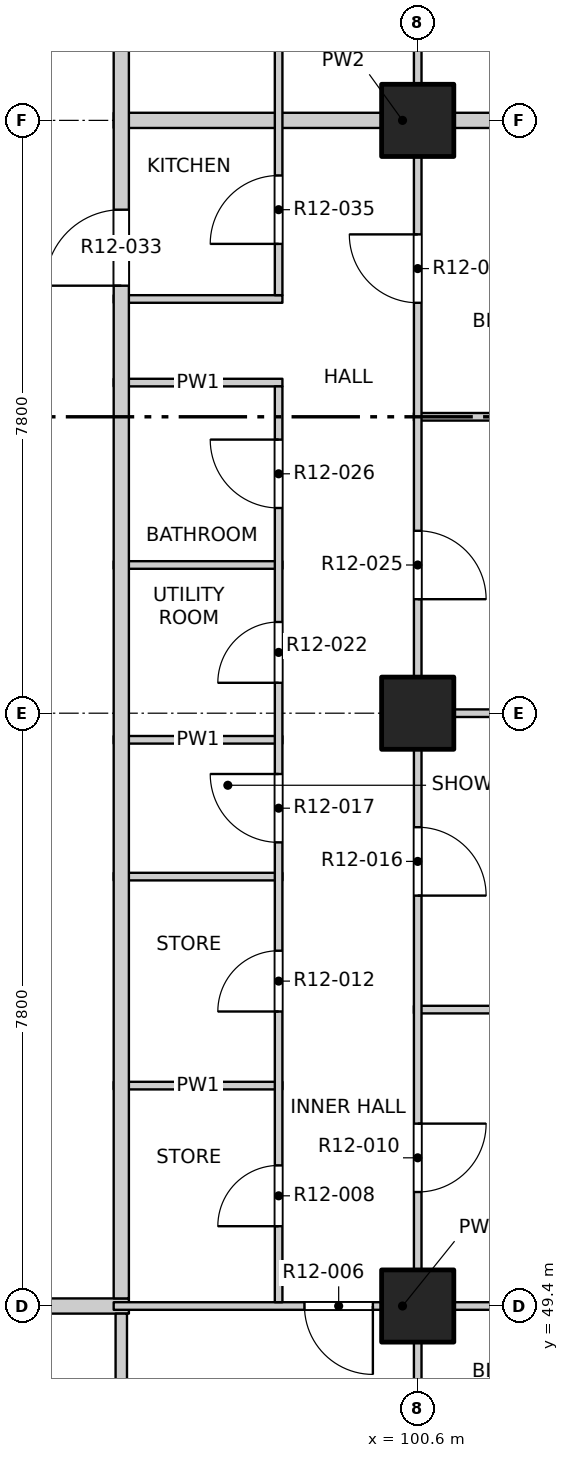
"""IFC4 building model, lengths in metres.
Left out: names, types, materials, properties, quantities, classifications, styles, units other than length and angle.
Written with IfcOpenShell. Run it as: python <this file> out.ifc"""

import sys

from ifc_helpers import new_model, si_unit, direction, frame, frame_2d, origin, origin_2d, place, context, subcontext, project, spatial, rectangle, extrude, element, fill, save


model = new_model("IFC4")
c1 = context("Model", 3, precision=1e-05, world=origin(), true_north=direction((0.0, 1.0)))
c2 = subcontext(c1, "Body", "Model", "MODEL_VIEW")
j1 = project(units=[si_unit("LENGTHUNIT", "METRE"), si_unit("PLANEANGLEUNIT", "RADIAN")], contexts=[c1])
p1 = place(None, origin())
s1 = spatial("IfcSite", under=j1, at=p1, CompositionType="ELEMENT")
p2 = place(p1, origin())
s2 = spatial("IfcBuilding", under=s1, at=p2, CompositionType="ELEMENT")
p3 = place(p2, frame((0.0, 0.0, 137.3)))
s3 = spatial("IfcBuildingStorey", under=s2, at=p3, CompositionType="ELEMENT", Elevation=137.3)
for number, where, z_axis, x_axis in (
    (1, (100.6, 49.4, -0.25), (0.0, 0.0, 1.0), (1.0, 0.0, 0.0)),
    (2, (100.6, 57.2, -0.25), (0.0, 0.0, 1.0), (1.0, 0.0, 0.0)),
    (3, (100.6, 65.0, -0.25), (0.0, 0.0, 1.0), (1.0, 0.0, 0.0)),
):
    element("IfcColumn", number, at=place(p3, frame(where, z_axis=z_axis, x_axis=x_axis)), inside=s3, PredefinedType="COLUMN", context=c2, shape_type="SweptSolid", body=[
        extrude(rectangle(XDim=0.95, YDim=0.95, at=origin_2d()), origin(), (0.0, 0.0, 1.0), 3.4),
    ])
p4 = place(p3, frame((73.2, 49.4, 0.0), z_axis=(0.0, 0.0, 1.0), x_axis=(1.0, 0.0, 0.0)))
e4 = element("IfcWall", 4, at=p4, inside=s3, PredefinedType="PARTITIONING", context=c2, shape_type="SweptSolid", body=[
    extrude(rectangle(XDim=23.6, YDim=0.2, at=frame_2d((11.8, 0.0))), origin(), (0.0, 0.0, 1.0), 3.15),
])
p5 = place(p4, frame((7.3, 0.0, 0.0)))
e5 = element("IfcOpeningElement", 5, at=p5, cuts=e4, PredefinedType="OPENING", context=c2, shape_type="SweptSolid", body=[
    extrude(rectangle(XDim=1.2, YDim=2.1, at=frame_2d((0.6, 1.05))), frame((0.0, 0.11, 0.0), z_axis=(0.0, -1.0, 0.0), x_axis=(1.0, 0.0, 0.0)), (0.0, 0.0, 1.0), 0.22),
])
p6 = place(p4, frame((17.825, 0.0, 0.0)))
e6 = element("IfcOpeningElement", 6, at=p6, cuts=e4, PredefinedType="OPENING", context=c2, shape_type="SweptSolid", body=[
    extrude(rectangle(XDim=1.2, YDim=2.1, at=frame_2d((0.6, 1.05))), frame((0.0, 0.11, 0.0), z_axis=(0.0, -1.0, 0.0), x_axis=(1.0, 0.0, 0.0)), (0.0, 0.0, 1.0), 0.22),
])
p7 = place(p3, frame((96.6, 49.4, 0.0), z_axis=(0.0, 0.0, 1.0), x_axis=(1.0, 0.0, 0.0)))
e7 = element("IfcWall", 7, at=p7, inside=s3, PredefinedType="PARTITIONING", context=c2, shape_type="SweptSolid", body=[
    extrude(rectangle(XDim=7.6, YDim=0.1, at=frame_2d((3.8, 0.0))), origin(), (0.0, 0.0, 1.0), 3.15),
])
p8 = place(p7, frame((2.51, 0.0, 0.0)))
e8 = element("IfcOpeningElement", 8, at=p8, cuts=e7, PredefinedType="OPENING", context=c2, shape_type="SweptSolid", body=[
    extrude(rectangle(XDim=0.9, YDim=2.1, at=frame_2d((0.45, 1.05))), frame((0.0, 0.06, 0.0), z_axis=(0.0, -1.0, 0.0), x_axis=(1.0, 0.0, 0.0)), (0.0, 0.0, 1.0), 0.12),
])
p9 = place(p3, frame((96.6, 52.3, 0.0), z_axis=(0.0, 0.0, 1.0), x_axis=(1.0, 0.0, 0.0)))
e9 = element("IfcWall", 9, at=p9, inside=s3, PredefinedType="PARTITIONING", context=c2, shape_type="SweptSolid", body=[
    extrude(rectangle(XDim=2.22, YDim=0.1, at=frame_2d((1.11, 0.0))), origin(), (0.0, 0.0, 1.0), 3.15),
])
p10 = place(p3, frame((100.55, 53.3, 0.0), z_axis=(0.0, 0.0, 1.0), x_axis=(1.0, 0.0, 0.0)))
e10 = element("IfcWall", 10, at=p10, inside=s3, PredefinedType="PARTITIONING", context=c2, shape_type="SweptSolid", body=[
    extrude(rectangle(XDim=3.65, YDim=0.1, at=frame_2d((1.825, 0.0))), origin(), (0.0, 0.0, 1.0), 3.15),
])
for number, where, z_axis, x_axis in (
    (11, (96.6, 55.05, 0.0), (0.0, 0.0, 1.0), (1.0, 0.0, 0.0)),
    (12, (96.6, 56.85, 0.0), (0.0, 0.0, 1.0), (1.0, 0.0, 0.0)),
):
    element("IfcWall", number, at=place(p3, frame(where, z_axis=z_axis, x_axis=x_axis)), inside=s3, PredefinedType="PARTITIONING", context=c2, shape_type="SweptSolid", body=[
        extrude(rectangle(XDim=2.22, YDim=0.1, at=frame_2d((1.11, 0.0))), origin(), (0.0, 0.0, 1.0), 3.15),
    ])
p11 = place(p3, frame((100.55, 57.2, 0.0), z_axis=(0.0, 0.0, 1.0), x_axis=(1.0, 0.0, 0.0)))
e13 = element("IfcWall", 13, at=p11, inside=s3, PredefinedType="PARTITIONING", context=c2, shape_type="SweptSolid", body=[
    extrude(rectangle(XDim=3.65, YDim=0.1, at=frame_2d((1.825, 0.0))), origin(), (0.0, 0.0, 1.0), 3.15),
])
p12 = place(p3, frame((96.6, 59.15, 0.0), z_axis=(0.0, 0.0, 1.0), x_axis=(1.0, 0.0, 0.0)))
e14 = element("IfcWall", 14, at=p12, inside=s3, PredefinedType="PARTITIONING", context=c2, shape_type="SweptSolid", body=[
    extrude(rectangle(XDim=2.22, YDim=0.1, at=frame_2d((1.11, 0.0))), origin(), (0.0, 0.0, 1.0), 3.15),
])
p13 = place(p3, frame((100.55, 61.1, 0.0), z_axis=(0.0, 0.0, 1.0), x_axis=(1.0, 0.0, 0.0)))
e15 = element("IfcWall", 15, at=p13, inside=s3, PredefinedType="PARTITIONING", context=c2, shape_type="SweptSolid", body=[
    extrude(rectangle(XDim=3.65, YDim=0.1, at=frame_2d((1.825, 0.0))), origin(), (0.0, 0.0, 1.0), 2.55),
])
for number, where, z_axis, x_axis in (
    (16, (96.6, 61.55, 0.0), (0.0, 0.0, 1.0), (1.0, 0.0, 0.0)),
    (17, (96.6, 62.65, 0.0), (0.0, 0.0, 1.0), (1.0, 0.0, 0.0)),
):
    element("IfcWall", number, at=place(p3, frame(where, z_axis=z_axis, x_axis=x_axis)), inside=s3, PredefinedType="PARTITIONING", context=c2, shape_type="SweptSolid", body=[
        extrude(rectangle(XDim=2.22, YDim=0.1, at=frame_2d((1.11, 0.0))), origin(), (0.0, 0.0, 1.0), 3.15),
    ])
p14 = place(p3, frame((96.6, 65.0, 0.0), z_axis=(0.0, 0.0, 1.0), x_axis=(1.0, 0.0, 0.0)))
e18 = element("IfcWall", 18, at=p14, inside=s3, PredefinedType="PARTITIONING", context=c2, shape_type="SweptSolid", body=[
    extrude(rectangle(XDim=7.6, YDim=0.2, at=frame_2d((3.8, 0.0))), origin(), (0.0, 0.0, 1.0), 3.15),
])
p15 = place(p3, frame((96.7, 45.8, 0.0), z_axis=(0.0, 0.0, 1.0), x_axis=(0.0, 1.0, 0.0)))
e19 = element("IfcWall", 19, at=p15, inside=s3, PredefinedType="PARTITIONING", context=c2, shape_type="SweptSolid", body=[
    extrude(rectangle(XDim=3.5, YDim=0.15, at=frame_2d((1.75, 0.0))), origin(), (0.0, 0.0, 1.0), 3.15),
])
p16 = place(p3, frame((96.7, 49.5, 0.0), z_axis=(0.0, 0.0, 1.0), x_axis=(0.0, 1.0, 0.0)))
e20 = element("IfcWall", 20, at=p16, inside=s3, PredefinedType="PARTITIONING", context=c2, shape_type="SweptSolid", body=[
    extrude(rectangle(XDim=34.7, YDim=0.2, at=frame_2d((17.35, 0.0))), origin(), (0.0, 0.0, 1.0), 3.15),
])
p17 = place(p16, frame((13.325, 0.0, 0.0)))
e21 = element("IfcOpeningElement", 21, at=p17, cuts=e20, PredefinedType="OPENING", context=c2, shape_type="SweptSolid", body=[
    extrude(rectangle(XDim=1.0, YDim=2.1, at=frame_2d((0.5, 1.05))), frame((0.0, 0.11, 0.0), z_axis=(0.0, -1.0, 0.0), x_axis=(1.0, 0.0, 0.0)), (0.0, 0.0, 1.0), 0.22),
])
p18 = place(p16, frame((29.625, 0.0, 0.0)))
e22 = element("IfcOpeningElement", 22, at=p18, cuts=e20, PredefinedType="OPENING", context=c2, shape_type="SweptSolid", body=[
    extrude(rectangle(XDim=1.0, YDim=2.1, at=frame_2d((0.5, 1.05))), frame((0.0, 0.11, 0.0), z_axis=(0.0, -1.0, 0.0), x_axis=(1.0, 0.0, 0.0)), (0.0, 0.0, 1.0), 0.22),
])
p19 = place(p3, frame((98.77, 49.45, 0.0), z_axis=(0.0, 0.0, 1.0), x_axis=(0.0, 1.0, 0.0)))
e23 = element("IfcWall", 23, at=p19, inside=s3, PredefinedType="PARTITIONING", context=c2, shape_type="SweptSolid", body=[
    extrude(rectangle(XDim=12.05, YDim=0.1, at=frame_2d((6.025, 0.0))), origin(), (0.0, 0.0, 1.0), 3.15),
])
p20 = place(p19, frame((1.0, 0.0, 0.0)))
e24 = element("IfcOpeningElement", 24, at=p20, cuts=e23, PredefinedType="OPENING", context=c2, shape_type="SweptSolid", body=[
    extrude(rectangle(XDim=0.8, YDim=2.1, at=frame_2d((0.4, 1.05))), frame((0.0, 0.06, 0.0), z_axis=(0.0, -1.0, 0.0), x_axis=(1.0, 0.0, 0.0)), (0.0, 0.0, 1.0), 0.12),
])
p21 = place(p19, frame((3.825, 0.0, 0.0)))
e25 = element("IfcOpeningElement", 25, at=p21, cuts=e23, PredefinedType="OPENING", context=c2, shape_type="SweptSolid", body=[
    extrude(rectangle(XDim=0.8, YDim=2.1, at=frame_2d((0.4, 1.05))), frame((0.0, 0.06, 0.0), z_axis=(0.0, -1.0, 0.0), x_axis=(1.0, 0.0, 0.0)), (0.0, 0.0, 1.0), 0.12),
])
p22 = place(p19, frame((6.05, 0.0, 0.0)))
e26 = element("IfcOpeningElement", 26, at=p22, cuts=e23, PredefinedType="OPENING", context=c2, shape_type="SweptSolid", body=[
    extrude(rectangle(XDim=0.9, YDim=2.1, at=frame_2d((0.45, 1.05))), frame((0.0, 0.06, 0.0), z_axis=(0.0, -1.0, 0.0), x_axis=(1.0, 0.0, 0.0)), (0.0, 0.0, 1.0), 0.12),
])
p23 = place(p19, frame((8.15, 0.0, 0.0)))
e27 = element("IfcOpeningElement", 27, at=p23, cuts=e23, PredefinedType="OPENING", context=c2, shape_type="SweptSolid", body=[
    extrude(rectangle(XDim=0.8, YDim=2.1, at=frame_2d((0.4, 1.05))), frame((0.0, 0.06, 0.0), z_axis=(0.0, -1.0, 0.0), x_axis=(1.0, 0.0, 0.0)), (0.0, 0.0, 1.0), 0.12),
])
p24 = place(p19, frame((10.45, 0.0, 0.0)))
e28 = element("IfcOpeningElement", 28, at=p24, cuts=e23, PredefinedType="OPENING", context=c2, shape_type="SweptSolid", body=[
    extrude(rectangle(XDim=0.9, YDim=2.1, at=frame_2d((0.45, 1.05))), frame((0.0, 0.06, 0.0), z_axis=(0.0, -1.0, 0.0), x_axis=(1.0, 0.0, 0.0)), (0.0, 0.0, 1.0), 0.12),
])
p25 = place(p3, frame((98.77, 62.7, 0.0), z_axis=(0.0, 0.0, 1.0), x_axis=(0.0, 1.0, 0.0)))
e29 = element("IfcWall", 29, at=p25, inside=s3, PredefinedType="PARTITIONING", context=c2, shape_type="SweptSolid", body=[
    extrude(rectangle(XDim=15.1, YDim=0.1, at=frame_2d((7.55, 0.0))), origin(), (0.0, 0.0, 1.0), 3.15),
])
p26 = place(p25, frame((0.675, 0.0, 0.0)))
e30 = element("IfcOpeningElement", 30, at=p26, cuts=e29, PredefinedType="OPENING", context=c2, shape_type="SweptSolid", body=[
    extrude(rectangle(XDim=0.9, YDim=2.1, at=frame_2d((0.45, 1.05))), frame((0.0, 0.06, 0.0), z_axis=(0.0, -1.0, 0.0), x_axis=(1.0, 0.0, 0.0)), (0.0, 0.0, 1.0), 0.12),
])
p27 = place(p25, frame((3.46, 0.0, 0.0)))
e31 = element("IfcOpeningElement", 31, at=p27, cuts=e29, PredefinedType="OPENING", context=c2, shape_type="SweptSolid", body=[
    extrude(rectangle(XDim=0.9, YDim=2.1, at=frame_2d((0.45, 1.05))), frame((0.0, 0.06, 0.0), z_axis=(0.0, -1.0, 0.0), x_axis=(1.0, 0.0, 0.0)), (0.0, 0.0, 1.0), 0.12),
])
p28 = place(p25, frame((6.27, 0.0, 0.0)))
e32 = element("IfcOpeningElement", 32, at=p28, cuts=e29, PredefinedType="OPENING", context=c2, shape_type="SweptSolid", body=[
    extrude(rectangle(XDim=0.9, YDim=2.1, at=frame_2d((0.45, 1.05))), frame((0.0, 0.06, 0.0), z_axis=(0.0, -1.0, 0.0), x_axis=(1.0, 0.0, 0.0)), (0.0, 0.0, 1.0), 0.12),
])
p29 = place(p25, frame((8.895, 0.0, 0.0)))
e33 = element("IfcOpeningElement", 33, at=p29, cuts=e29, PredefinedType="OPENING", context=c2, shape_type="SweptSolid", body=[
    extrude(rectangle(XDim=0.8, YDim=2.1, at=frame_2d((0.4, 1.05))), frame((0.0, 0.06, 0.0), z_axis=(0.0, -1.0, 0.0), x_axis=(1.0, 0.0, 0.0)), (0.0, 0.0, 1.0), 0.12),
])
p30 = place(p25, frame((11.57, 0.0, 0.0)))
e34 = element("IfcOpeningElement", 34, at=p30, cuts=e29, PredefinedType="OPENING", context=c2, shape_type="SweptSolid", body=[
    extrude(rectangle(XDim=0.8, YDim=2.1, at=frame_2d((0.4, 1.05))), frame((0.0, 0.06, 0.0), z_axis=(0.0, -1.0, 0.0), x_axis=(1.0, 0.0, 0.0)), (0.0, 0.0, 1.0), 0.12),
])
p31 = place(p25, frame((13.76, 0.0, 0.0)))
e35 = element("IfcOpeningElement", 35, at=p31, cuts=e29, PredefinedType="OPENING", context=c2, shape_type="SweptSolid", body=[
    extrude(rectangle(XDim=0.9, YDim=2.1, at=frame_2d((0.45, 1.05))), frame((0.0, 0.06, 0.0), z_axis=(0.0, -1.0, 0.0), x_axis=(1.0, 0.0, 0.0)), (0.0, 0.0, 1.0), 0.12),
])
p32 = place(p3, frame((100.6, 45.8, 0.0), z_axis=(0.0, 0.0, 1.0), x_axis=(0.0, 1.0, 0.0)))
e36 = element("IfcWall", 36, at=p32, inside=s3, PredefinedType="PARTITIONING", context=c2, shape_type="SweptSolid", body=[
    extrude(rectangle(XDim=38.4, YDim=0.1, at=frame_2d((19.2, 0.0))), origin(), (0.0, 0.0, 1.0), 3.15),
])
p33 = place(p32, frame((1.05, 0.0, 0.0)))
e37 = element("IfcOpeningElement", 37, at=p33, cuts=e36, PredefinedType="OPENING", context=c2, shape_type="SweptSolid", body=[
    extrude(rectangle(XDim=1.2, YDim=2.1, at=frame_2d((0.6, 1.05))), frame((0.0, 0.06, 0.0), z_axis=(0.0, -1.0, 0.0), x_axis=(1.0, 0.0, 0.0)), (0.0, 0.0, 1.0), 0.12),
])
p34 = place(p32, frame((5.1, 0.0, 0.0)))
e38 = element("IfcOpeningElement", 38, at=p34, cuts=e36, PredefinedType="OPENING", context=c2, shape_type="SweptSolid", body=[
    extrude(rectangle(XDim=0.9, YDim=2.1, at=frame_2d((0.45, 1.05))), frame((0.0, 0.06, 0.0), z_axis=(0.0, -1.0, 0.0), x_axis=(1.0, 0.0, 0.0)), (0.0, 0.0, 1.0), 0.12),
])
p35 = place(p32, frame((9.0, 0.0, 0.0)))
e39 = element("IfcOpeningElement", 39, at=p35, cuts=e36, PredefinedType="OPENING", context=c2, shape_type="SweptSolid", body=[
    extrude(rectangle(XDim=0.9, YDim=2.1, at=frame_2d((0.45, 1.05))), frame((0.0, 0.06, 0.0), z_axis=(0.0, -1.0, 0.0), x_axis=(1.0, 0.0, 0.0)), (0.0, 0.0, 1.0), 0.12),
])
p36 = place(p32, frame((12.9, 0.0, 0.0)))
e40 = element("IfcOpeningElement", 40, at=p36, cuts=e36, PredefinedType="OPENING", context=c2, shape_type="SweptSolid", body=[
    extrude(rectangle(XDim=0.9, YDim=2.1, at=frame_2d((0.45, 1.05))), frame((0.0, 0.06, 0.0), z_axis=(0.0, -1.0, 0.0), x_axis=(1.0, 0.0, 0.0)), (0.0, 0.0, 1.0), 0.12),
])
p37 = place(p32, frame((16.8, 0.0, 0.0)))
e41 = element("IfcOpeningElement", 41, at=p37, cuts=e36, PredefinedType="OPENING", context=c2, shape_type="SweptSolid", body=[
    extrude(rectangle(XDim=0.9, YDim=2.1, at=frame_2d((0.45, 1.05))), frame((0.0, 0.06, 0.0), z_axis=(0.0, -1.0, 0.0), x_axis=(1.0, 0.0, 0.0)), (0.0, 0.0, 1.0), 0.12),
])
p38 = place(p32, frame((20.7, 0.0, 0.0)))
e42 = element("IfcOpeningElement", 42, at=p38, cuts=e36, PredefinedType="OPENING", context=c2, shape_type="SweptSolid", body=[
    extrude(rectangle(XDim=0.9, YDim=2.1, at=frame_2d((0.45, 1.05))), frame((0.0, 0.06, 0.0), z_axis=(0.0, -1.0, 0.0), x_axis=(1.0, 0.0, 0.0)), (0.0, 0.0, 1.0), 0.12),
])
p39 = place(p32, frame((24.6, 0.0, 0.0)))
e43 = element("IfcOpeningElement", 43, at=p39, cuts=e36, PredefinedType="OPENING", context=c2, shape_type="SweptSolid", body=[
    extrude(rectangle(XDim=0.9, YDim=2.1, at=frame_2d((0.45, 1.05))), frame((0.0, 0.06, 0.0), z_axis=(0.0, -1.0, 0.0), x_axis=(1.0, 0.0, 0.0)), (0.0, 0.0, 1.0), 0.12),
])
p40 = place(p32, frame((28.5, 0.0, 0.0)))
e44 = element("IfcOpeningElement", 44, at=p40, cuts=e36, PredefinedType="OPENING", context=c2, shape_type="SweptSolid", body=[
    extrude(rectangle(XDim=0.9, YDim=2.1, at=frame_2d((0.45, 1.05))), frame((0.0, 0.06, 0.0), z_axis=(0.0, -1.0, 0.0), x_axis=(1.0, 0.0, 0.0)), (0.0, 0.0, 1.0), 0.12),
])
p41 = place(p32, frame((32.4, 0.0, 0.0)))
e45 = element("IfcOpeningElement", 45, at=p41, cuts=e36, PredefinedType="OPENING", context=c2, shape_type="SweptSolid", body=[
    extrude(rectangle(XDim=0.9, YDim=2.1, at=frame_2d((0.45, 1.05))), frame((0.0, 0.06, 0.0), z_axis=(0.0, -1.0, 0.0), x_axis=(1.0, 0.0, 0.0)), (0.0, 0.0, 1.0), 0.12),
])
p42 = place(p32, frame((36.15, 0.0, 0.0)))
e46 = element("IfcOpeningElement", 46, at=p42, cuts=e36, PredefinedType="OPENING", context=c2, shape_type="SweptSolid", body=[
    extrude(rectangle(XDim=1.2, YDim=2.1, at=frame_2d((0.6, 1.05))), frame((0.0, 0.06, 0.0), z_axis=(0.0, -1.0, 0.0), x_axis=(1.0, 0.0, 0.0)), (0.0, 0.0, 1.0), 0.12),
])
p43 = place(p8, origin())
e47 = element("IfcDoor", 47, at=p43, inside=s3, OperationType="SINGLE_SWING_LEFT", PredefinedType="DOOR", context=c2, shape_type="SweptSolid", body=[
    extrude(rectangle(XDim=0.9, YDim=2.1, at=frame_2d((0.45, 1.05))), frame((0.0, 0.025, 0.0), z_axis=(0.0, -1.0, 0.0), x_axis=(1.0, 0.0, 0.0)), (0.0, 0.0, 1.0), 0.05),
])
fill(e8, e47)
p44 = place(p20, origin())
e48 = element("IfcDoor", 48, at=p44, inside=s3, OperationType="SINGLE_SWING_LEFT", PredefinedType="DOOR", context=c2, shape_type="SweptSolid", body=[
    extrude(rectangle(XDim=0.8, YDim=2.1, at=frame_2d((0.4, 1.05))), frame((0.0, 0.025, 0.0), z_axis=(0.0, -1.0, 0.0), x_axis=(1.0, 0.0, 0.0)), (0.0, 0.0, 1.0), 0.05),
])
fill(e24, e48)
p45 = place(p34, origin())
e49 = element("IfcDoor", 49, at=p45, inside=s3, OperationType="SINGLE_SWING_LEFT", PredefinedType="DOOR", context=c2, shape_type="SweptSolid", body=[
    extrude(rectangle(XDim=0.9, YDim=2.1, at=frame_2d((0.45, 1.05))), frame((0.0, 0.025, 0.0), z_axis=(0.0, -1.0, 0.0), x_axis=(1.0, 0.0, 0.0)), (0.0, 0.0, 1.0), 0.05),
])
fill(e38, e49)
p46 = place(p21, origin())
e50 = element("IfcDoor", 50, at=p46, inside=s3, OperationType="SINGLE_SWING_LEFT", PredefinedType="DOOR", context=c2, shape_type="SweptSolid", body=[
    extrude(rectangle(XDim=0.8, YDim=2.1, at=frame_2d((0.4, 1.05))), frame((0.0, 0.025, 0.0), z_axis=(0.0, -1.0, 0.0), x_axis=(1.0, 0.0, 0.0)), (0.0, 0.0, 1.0), 0.05),
])
fill(e25, e50)
p47 = place(p35, origin())
e51 = element("IfcDoor", 51, at=p47, inside=s3, OperationType="SINGLE_SWING_RIGHT", PredefinedType="DOOR", context=c2, shape_type="SweptSolid", body=[
    extrude(rectangle(XDim=0.9, YDim=2.1, at=frame_2d((0.45, 1.05))), frame((0.0, 0.025, 0.0), z_axis=(0.0, -1.0, 0.0), x_axis=(1.0, 0.0, 0.0)), (0.0, 0.0, 1.0), 0.05),
])
fill(e39, e51)
p48 = place(p22, origin())
e52 = element("IfcDoor", 52, at=p48, inside=s3, OperationType="SINGLE_SWING_RIGHT", PredefinedType="DOOR", context=c2, shape_type="SweptSolid", body=[
    extrude(rectangle(XDim=0.9, YDim=2.1, at=frame_2d((0.45, 1.05))), frame((0.0, 0.025, 0.0), z_axis=(0.0, -1.0, 0.0), x_axis=(1.0, 0.0, 0.0)), (0.0, 0.0, 1.0), 0.05),
])
fill(e26, e52)
p49 = place(p23, origin())
e53 = element("IfcDoor", 53, at=p49, inside=s3, OperationType="SINGLE_SWING_LEFT", PredefinedType="DOOR", context=c2, shape_type="SweptSolid", body=[
    extrude(rectangle(XDim=0.8, YDim=2.1, at=frame_2d((0.4, 1.05))), frame((0.0, 0.025, 0.0), z_axis=(0.0, -1.0, 0.0), x_axis=(1.0, 0.0, 0.0)), (0.0, 0.0, 1.0), 0.05),
])
fill(e27, e53)
p50 = place(p36, origin())
e54 = element("IfcDoor", 54, at=p50, inside=s3, OperationType="SINGLE_SWING_RIGHT", PredefinedType="DOOR", context=c2, shape_type="SweptSolid", body=[
    extrude(rectangle(XDim=0.9, YDim=2.1, at=frame_2d((0.45, 1.05))), frame((0.0, 0.025, 0.0), z_axis=(0.0, -1.0, 0.0), x_axis=(1.0, 0.0, 0.0)), (0.0, 0.0, 1.0), 0.05),
])
fill(e40, e54)
p51 = place(p24, origin())
e55 = element("IfcDoor", 55, at=p51, inside=s3, OperationType="SINGLE_SWING_RIGHT", PredefinedType="DOOR", context=c2, shape_type="SweptSolid", body=[
    extrude(rectangle(XDim=0.9, YDim=2.1, at=frame_2d((0.45, 1.05))), frame((0.0, 0.025, 0.0), z_axis=(0.0, -1.0, 0.0), x_axis=(1.0, 0.0, 0.0)), (0.0, 0.0, 1.0), 0.05),
])
fill(e28, e55)
p52 = place(p37, origin())
e56 = element("IfcDoor", 56, at=p52, inside=s3, OperationType="SINGLE_SWING_RIGHT", PredefinedType="DOOR", context=c2, shape_type="SweptSolid", body=[
    extrude(rectangle(XDim=0.9, YDim=2.1, at=frame_2d((0.45, 1.05))), frame((0.0, 0.025, 0.0), z_axis=(0.0, -1.0, 0.0), x_axis=(1.0, 0.0, 0.0)), (0.0, 0.0, 1.0), 0.05),
])
fill(e41, e56)
p53 = place(p17, origin())
e57 = element("IfcDoor", 57, at=p53, inside=s3, OperationType="SINGLE_SWING_LEFT", PredefinedType="DOOR", context=c2, shape_type="SweptSolid", body=[
    extrude(rectangle(XDim=1.0, YDim=2.1, at=frame_2d((0.5, 1.05))), frame((0.0, 0.025, 0.0), z_axis=(0.0, -1.0, 0.0), x_axis=(1.0, 0.0, 0.0)), (0.0, 0.0, 1.0), 0.05),
])
fill(e21, e57)
p54 = place(p26, origin())
e58 = element("IfcDoor", 58, at=p54, inside=s3, OperationType="SINGLE_SWING_LEFT", PredefinedType="DOOR", context=c2, shape_type="SweptSolid", body=[
    extrude(rectangle(XDim=0.9, YDim=2.1, at=frame_2d((0.45, 1.05))), frame((0.0, 0.025, 0.0), z_axis=(0.0, -1.0, 0.0), x_axis=(1.0, 0.0, 0.0)), (0.0, 0.0, 1.0), 0.05),
])
fill(e30, e58)
save(model, sys.argv[1])
